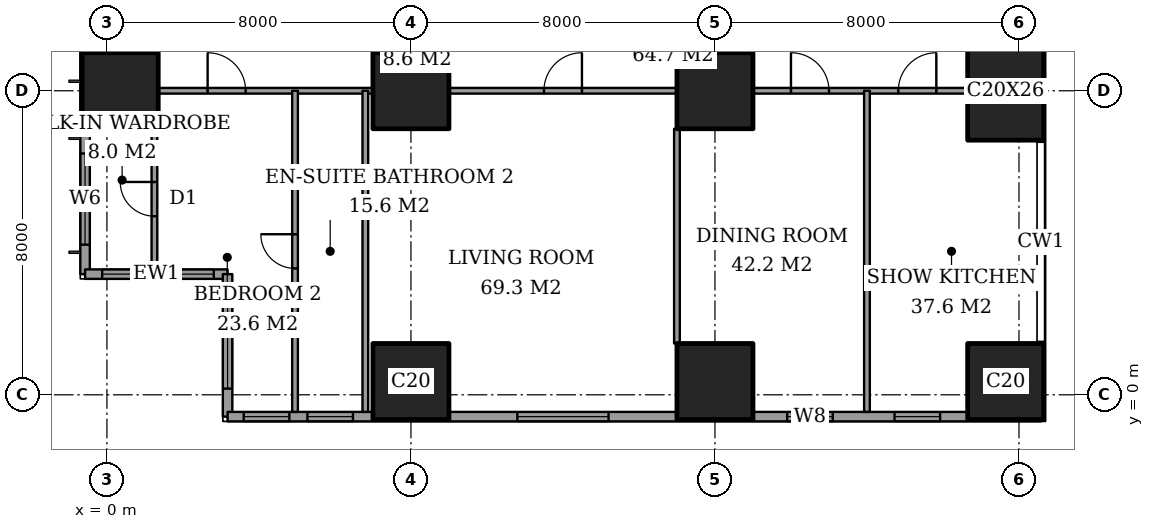
"""IFC4 building model, lengths in metres.
Left out: names, types, materials, properties, quantities, classifications, styles, units other than length and angle.
Written with IfcOpenShell. Run it as: python <this file> out.ifc"""

import sys

from ifc_helpers import new_model, si_unit, direction, frame, frame_2d, origin, origin_2d, place, context, subcontext, project, spatial, rectangle, extrude, element, fill, save


model = new_model("IFC4")
c1 = context("Model", 3, precision=1e-05, world=origin(), true_north=direction((0.0, 1.0)))
c2 = subcontext(c1, "Body", "Model", "MODEL_VIEW")
j1 = project(units=[si_unit("LENGTHUNIT", "METRE"), si_unit("PLANEANGLEUNIT", "RADIAN")], contexts=[c1])
p1 = place(None, origin())
s1 = spatial("IfcSite", under=j1, at=p1, CompositionType="ELEMENT")
p2 = place(p1, origin())
s2 = spatial("IfcBuilding", under=s1, at=p2, CompositionType="ELEMENT")
p3 = place(p2, frame((0.0, 0.0, 80.0)))
s3 = spatial("IfcBuildingStorey", under=s2, at=p3, CompositionType="ELEMENT", Elevation=80.0)
for number, where, z_axis, x_axis in (
    (1, (0.35, 8.0, 0.0), (0.0, 0.0, 1.0), (1.0, 0.0, 0.0)),
    (2, (8.0, 0.35, 0.0), (0.0, 0.0, 1.0), (1.0, 0.0, 0.0)),
    (3, (8.0, 8.0, 0.0), (0.0, 0.0, 1.0), (1.0, 0.0, 0.0)),
    (4, (16.0, 0.35, 0.0), (0.0, 0.0, 1.0), (1.0, 0.0, 0.0)),
    (5, (16.0, 8.0, 0.0), (0.0, 0.0, 1.0), (1.0, 0.0, 0.0)),
    (6, (23.65, 0.35, 0.0), (0.0, 0.0, 1.0), (1.0, 0.0, 0.0)),
):
    element("IfcColumn", number, at=place(p3, frame(where, z_axis=z_axis, x_axis=x_axis)), inside=s3, PredefinedType="COLUMN", context=c2, shape_type="SweptSolid", body=[
        extrude(rectangle(XDim=2.0, YDim=2.0, at=origin_2d()), origin(), (0.0, 0.0, 1.0), 3.6),
    ])
p4 = place(p3, frame((23.65, 8.0, 0.0), z_axis=(0.0, 0.0, 1.0), x_axis=(1.0, 0.0, 0.0)))
e7 = element("IfcColumn", 7, at=p4, inside=s3, PredefinedType="COLUMN", context=c2, shape_type="SweptSolid", body=[
    extrude(rectangle(XDim=2.0, YDim=2.6, at=origin_2d()), origin(), (0.0, 0.0, 1.0), 3.6),
])
p5 = place(p3, frame((-0.575, 44.825, 0.0), z_axis=(0.0, 0.0, 1.0), x_axis=(0.0, -1.0, 0.0)))
e8 = element("IfcWall", 8, at=p5, inside=s3, PredefinedType="SOLIDWALL", context=c2, shape_type="SweptSolid", body=[
    extrude(rectangle(XDim=41.65, YDim=0.25, at=frame_2d((20.825, 0.0))), origin(), (0.0, 0.0, 1.0), 3.6),
])
p6 = place(p5, frame((0.775, 0.0, 0.6)))
e9 = element("IfcOpeningElement", 9, at=p6, cuts=e8, PredefinedType="OPENING", context=c2, shape_type="SweptSolid", body=[
    extrude(rectangle(XDim=2.4, YDim=2.0, at=frame_2d((1.2, 1.0))), frame((0.0, 0.135, 0.0), z_axis=(0.0, -1.0, 0.0), x_axis=(1.0, 0.0, 0.0)), (0.0, 0.0, 1.0), 0.27),
])
p7 = place(p5, frame((6.1, 0.0, 0.6)))
e10 = element("IfcOpeningElement", 10, at=p7, cuts=e8, PredefinedType="OPENING", context=c2, shape_type="SweptSolid", body=[
    extrude(rectangle(XDim=1.2, YDim=2.0, at=frame_2d((0.6, 1.0))), frame((0.0, 0.135, 0.0), z_axis=(0.0, -1.0, 0.0), x_axis=(1.0, 0.0, 0.0)), (0.0, 0.0, 1.0), 0.27),
])
p8 = place(p5, frame((8.425, 0.0, 0.6)))
e11 = element("IfcOpeningElement", 11, at=p8, cuts=e8, PredefinedType="OPENING", context=c2, shape_type="SweptSolid", body=[
    extrude(rectangle(XDim=2.4, YDim=2.0, at=frame_2d((1.2, 1.0))), frame((0.0, 0.135, 0.0), z_axis=(0.0, -1.0, 0.0), x_axis=(1.0, 0.0, 0.0)), (0.0, 0.0, 1.0), 0.27),
])
p9 = place(p5, frame((15.625, 0.0, 0.6)))
e12 = element("IfcOpeningElement", 12, at=p9, cuts=e8, PredefinedType="OPENING", context=c2, shape_type="SweptSolid", body=[
    extrude(rectangle(XDim=2.4, YDim=2.0, at=frame_2d((1.2, 1.0))), frame((0.0, 0.135, 0.0), z_axis=(0.0, -1.0, 0.0), x_axis=(1.0, 0.0, 0.0)), (0.0, 0.0, 1.0), 0.27),
])
p10 = place(p5, frame((23.625, 0.0, 0.6)))
e13 = element("IfcOpeningElement", 13, at=p10, cuts=e8, PredefinedType="OPENING", context=c2, shape_type="SweptSolid", body=[
    extrude(rectangle(XDim=2.4, YDim=2.0, at=frame_2d((1.2, 1.0))), frame((0.0, 0.135, 0.0), z_axis=(0.0, -1.0, 0.0), x_axis=(1.0, 0.0, 0.0)), (0.0, 0.0, 1.0), 0.27),
])
p11 = place(p5, frame((30.825, 0.0, 0.6)))
e14 = element("IfcOpeningElement", 14, at=p11, cuts=e8, PredefinedType="OPENING", context=c2, shape_type="SweptSolid", body=[
    extrude(rectangle(XDim=2.4, YDim=2.0, at=frame_2d((1.2, 1.0))), frame((0.0, 0.135, 0.0), z_axis=(0.0, -1.0, 0.0), x_axis=(1.0, 0.0, 0.0)), (0.0, 0.0, 1.0), 0.27),
])
p12 = place(p5, frame((34.5, 0.0, 0.6)))
e15 = element("IfcOpeningElement", 15, at=p12, cuts=e8, PredefinedType="OPENING", context=c2, shape_type="SweptSolid", body=[
    extrude(rectangle(XDim=1.2, YDim=2.0, at=frame_2d((0.6, 1.0))), frame((0.0, 0.135, 0.0), z_axis=(0.0, -1.0, 0.0), x_axis=(1.0, 0.0, 0.0)), (0.0, 0.0, 1.0), 0.27),
])
p13 = place(p5, frame((38.475, 0.0, 0.6)))
e16 = element("IfcOpeningElement", 16, at=p13, cuts=e8, PredefinedType="OPENING", context=c2, shape_type="SweptSolid", body=[
    extrude(rectangle(XDim=2.4, YDim=2.0, at=frame_2d((1.2, 1.0))), frame((0.0, 0.135, 0.0), z_axis=(0.0, -1.0, 0.0), x_axis=(1.0, 0.0, 0.0)), (0.0, 0.0, 1.0), 0.27),
])
p14 = place(p3, frame((-0.575, 3.175, 0.0), z_axis=(0.0, 0.0, 1.0), x_axis=(1.0, 0.0, 0.0)))
e17 = element("IfcWall", 17, at=p14, inside=s3, PredefinedType="SOLIDWALL", context=c2, shape_type="SweptSolid", body=[
    extrude(rectangle(XDim=3.75, YDim=0.25, at=frame_2d((1.875, 0.0))), origin(), (0.0, 0.0, 1.0), 3.6),
])
p15 = place(p14, frame((0.45, 0.0, 0.6)))
e18 = element("IfcOpeningElement", 18, at=p15, cuts=e17, PredefinedType="OPENING", context=c2, shape_type="SweptSolid", body=[
    extrude(rectangle(XDim=1.2, YDim=2.0, at=frame_2d((0.6, 1.0))), frame((0.0, 0.135, 0.0), z_axis=(0.0, -1.0, 0.0), x_axis=(1.0, 0.0, 0.0)), (0.0, 0.0, 1.0), 0.27),
])
p16 = place(p14, frame((2.188, 0.0, 0.6)))
e19 = element("IfcOpeningElement", 19, at=p16, cuts=e17, PredefinedType="OPENING", context=c2, shape_type="SweptSolid", body=[
    extrude(rectangle(XDim=1.2, YDim=2.0, at=frame_2d((0.6, 1.0))), frame((0.0, 0.135, 0.0), z_axis=(0.0, -1.0, 0.0), x_axis=(1.0, 0.0, 0.0)), (0.0, 0.0, 1.0), 0.27),
])
p17 = place(p3, frame((3.175, 3.175, 0.0), z_axis=(0.0, 0.0, 1.0), x_axis=(0.0, -1.0, 0.0)))
e20 = element("IfcWall", 20, at=p17, inside=s3, PredefinedType="SOLIDWALL", context=c2, shape_type="SweptSolid", body=[
    extrude(rectangle(XDim=3.75, YDim=0.25, at=frame_2d((1.875, 0.0))), origin(), (0.0, 0.0, 1.0), 3.6),
])
p18 = place(p17, frame((0.613, 0.0, 0.6)))
e21 = element("IfcOpeningElement", 21, at=p18, cuts=e20, PredefinedType="OPENING", context=c2, shape_type="SweptSolid", body=[
    extrude(rectangle(XDim=2.4, YDim=2.0, at=frame_2d((1.2, 1.0))), frame((0.0, 0.135, 0.0), z_axis=(0.0, -1.0, 0.0), x_axis=(1.0, 0.0, 0.0)), (0.0, 0.0, 1.0), 0.27),
])
p19 = place(p3, frame((3.175, -0.575, 0.0), z_axis=(0.0, 0.0, 1.0), x_axis=(1.0, 0.0, 0.0)))
e22 = element("IfcWall", 22, at=p19, inside=s3, PredefinedType="SOLIDWALL", context=c2, shape_type="SweptSolid", body=[
    extrude(rectangle(XDim=21.4, YDim=0.25, at=frame_2d((10.7, 0.0))), origin(), (0.0, 0.0, 1.0), 3.6),
])
p20 = place(p19, frame((0.425, 0.0, 0.6)))
e23 = element("IfcOpeningElement", 23, at=p20, cuts=e22, PredefinedType="OPENING", context=c2, shape_type="SweptSolid", body=[
    extrude(rectangle(XDim=1.2, YDim=2.0, at=frame_2d((0.6, 1.0))), frame((0.0, 0.135, 0.0), z_axis=(0.0, -1.0, 0.0), x_axis=(1.0, 0.0, 0.0)), (0.0, 0.0, 1.0), 0.27),
])
p21 = place(p19, frame((2.1, 0.0, 0.6)))
e24 = element("IfcOpeningElement", 24, at=p21, cuts=e22, PredefinedType="OPENING", context=c2, shape_type="SweptSolid", body=[
    extrude(rectangle(XDim=1.2, YDim=2.0, at=frame_2d((0.6, 1.0))), frame((0.0, 0.135, 0.0), z_axis=(0.0, -1.0, 0.0), x_axis=(1.0, 0.0, 0.0)), (0.0, 0.0, 1.0), 0.27),
])
p22 = place(p19, frame((7.625, 0.0, 0.6)))
e25 = element("IfcOpeningElement", 25, at=p22, cuts=e22, PredefinedType="OPENING", context=c2, shape_type="SweptSolid", body=[
    extrude(rectangle(XDim=2.4, YDim=2.0, at=frame_2d((1.2, 1.0))), frame((0.0, 0.135, 0.0), z_axis=(0.0, -1.0, 0.0), x_axis=(1.0, 0.0, 0.0)), (0.0, 0.0, 1.0), 0.27),
])
p23 = place(p19, frame((14.725, 0.0, 0.6)))
e26 = element("IfcOpeningElement", 26, at=p23, cuts=e22, PredefinedType="OPENING", context=c2, shape_type="SweptSolid", body=[
    extrude(rectangle(XDim=1.2, YDim=2.0, at=frame_2d((0.6, 1.0))), frame((0.0, 0.135, 0.0), z_axis=(0.0, -1.0, 0.0), x_axis=(1.0, 0.0, 0.0)), (0.0, 0.0, 1.0), 0.27),
])
p24 = place(p19, frame((17.55, 0.0, 0.6)))
e27 = element("IfcOpeningElement", 27, at=p24, cuts=e22, PredefinedType="OPENING", context=c2, shape_type="SweptSolid", body=[
    extrude(rectangle(XDim=1.2, YDim=2.0, at=frame_2d((0.6, 1.0))), frame((0.0, 0.135, 0.0), z_axis=(0.0, -1.0, 0.0), x_axis=(1.0, 0.0, 0.0)), (0.0, 0.0, 1.0), 0.27),
])
p25 = place(p3, frame((1.35, 8.0, 0.0), z_axis=(0.0, 0.0, 1.0), x_axis=(1.0, 0.0, 0.0)))
e28 = element("IfcWall", 28, at=p25, inside=s3, PredefinedType="PARTITIONING", context=c2, shape_type="SweptSolid", body=[
    extrude(rectangle(XDim=5.65, YDim=0.15, at=frame_2d((2.825, 0.0))), origin(), (0.0, 0.0, 1.0), 3.35),
])
p26 = place(p25, frame((1.3, 0.0, 0.0)))
e29 = element("IfcOpeningElement", 29, at=p26, cuts=e28, PredefinedType="OPENING", context=c2, shape_type="SweptSolid", body=[
    extrude(rectangle(XDim=1.0, YDim=2.1, at=frame_2d((0.5, 1.05))), frame((0.0, 0.085, 0.0), z_axis=(0.0, -1.0, 0.0), x_axis=(1.0, 0.0, 0.0)), (0.0, 0.0, 1.0), 0.17),
])
p27 = place(p3, frame((9.0, 8.0, 0.0), z_axis=(0.0, 0.0, 1.0), x_axis=(1.0, 0.0, 0.0)))
e30 = element("IfcWall", 30, at=p27, inside=s3, PredefinedType="PARTITIONING", context=c2, shape_type="SweptSolid", body=[
    extrude(rectangle(XDim=6.0, YDim=0.15, at=frame_2d((3.0, 0.0))), origin(), (0.0, 0.0, 1.0), 3.35),
])
p28 = place(p27, frame((2.5, 0.0, 0.0)))
e31 = element("IfcOpeningElement", 31, at=p28, cuts=e30, PredefinedType="OPENING", context=c2, shape_type="SweptSolid", body=[
    extrude(rectangle(XDim=1.0, YDim=2.1, at=frame_2d((0.5, 1.05))), frame((0.0, 0.085, 0.0), z_axis=(0.0, -1.0, 0.0), x_axis=(1.0, 0.0, 0.0)), (0.0, 0.0, 1.0), 0.17),
])
p29 = place(p3, frame((17.0, 8.0, 0.0), z_axis=(0.0, 0.0, 1.0), x_axis=(1.0, 0.0, 0.0)))
e32 = element("IfcWall", 32, at=p29, inside=s3, PredefinedType="PARTITIONING", context=c2, shape_type="SweptSolid", body=[
    extrude(rectangle(XDim=5.65, YDim=0.15, at=frame_2d((2.825, 0.0))), origin(), (0.0, 0.0, 1.0), 3.35),
])
p30 = place(p29, frame((1.0, 0.0, 0.0)))
e33 = element("IfcOpeningElement", 33, at=p30, cuts=e32, PredefinedType="OPENING", context=c2, shape_type="SweptSolid", body=[
    extrude(rectangle(XDim=1.0, YDim=2.1, at=frame_2d((0.5, 1.05))), frame((0.0, 0.085, 0.0), z_axis=(0.0, -1.0, 0.0), x_axis=(1.0, 0.0, 0.0)), (0.0, 0.0, 1.0), 0.17),
])
p31 = place(p29, frame((3.825, 0.0, 0.0)))
e34 = element("IfcOpeningElement", 34, at=p31, cuts=e32, PredefinedType="OPENING", context=c2, shape_type="SweptSolid", body=[
    extrude(rectangle(XDim=1.0, YDim=2.1, at=frame_2d((0.5, 1.05))), frame((0.0, 0.085, 0.0), z_axis=(0.0, -1.0, 0.0), x_axis=(1.0, 0.0, 0.0)), (0.0, 0.0, 1.0), 0.17),
])
p32 = place(p3, frame((1.25, 3.3, 0.0), z_axis=(0.0, 0.0, 1.0), x_axis=(0.0, 1.0, 0.0)))
e35 = element("IfcWall", 35, at=p32, inside=s3, PredefinedType="PARTITIONING", context=c2, shape_type="SweptSolid", body=[
    extrude(rectangle(XDim=3.7, YDim=0.15, at=frame_2d((1.85, 0.0))), origin(), (0.0, 0.0, 1.0), 3.35),
])
p33 = place(p32, frame((1.4, 0.0, 0.0)))
e36 = element("IfcOpeningElement", 36, at=p33, cuts=e35, PredefinedType="OPENING", context=c2, shape_type="SweptSolid", body=[
    extrude(rectangle(XDim=0.9, YDim=2.1, at=frame_2d((0.45, 1.05))), frame((0.0, 0.085, 0.0), z_axis=(0.0, -1.0, 0.0), x_axis=(1.0, 0.0, 0.0)), (0.0, 0.0, 1.0), 0.17),
])
p34 = place(p3, frame((4.95, -0.45, 0.0), z_axis=(0.0, 0.0, 1.0), x_axis=(0.0, 1.0, 0.0)))
e37 = element("IfcWall", 37, at=p34, inside=s3, PredefinedType="PARTITIONING", context=c2, shape_type="SweptSolid", body=[
    extrude(rectangle(XDim=8.45, YDim=0.15, at=frame_2d((4.225, 0.0))), origin(), (0.0, 0.0, 1.0), 3.35),
])
p35 = place(p34, frame((3.775, 0.0, 0.0)))
e38 = element("IfcOpeningElement", 38, at=p35, cuts=e37, PredefinedType="OPENING", context=c2, shape_type="SweptSolid", body=[
    extrude(rectangle(XDim=0.9, YDim=2.1, at=frame_2d((0.45, 1.05))), frame((0.0, 0.085, 0.0), z_axis=(0.0, -1.0, 0.0), x_axis=(1.0, 0.0, 0.0)), (0.0, 0.0, 1.0), 0.17),
])
p36 = place(p3, frame((6.8, -0.45, 0.0), z_axis=(0.0, 0.0, 1.0), x_axis=(0.0, 1.0, 0.0)))
e39 = element("IfcWall", 39, at=p36, inside=s3, PredefinedType="PARTITIONING", context=c2, shape_type="SweptSolid", body=[
    extrude(rectangle(XDim=8.45, YDim=0.15, at=frame_2d((4.225, 0.0))), origin(), (0.0, 0.0, 1.0), 3.35),
])
p37 = place(p3, frame((15.0, 1.35, 0.0), z_axis=(0.0, 0.0, 1.0), x_axis=(0.0, 1.0, 0.0)))
e40 = element("IfcWall", 40, at=p37, inside=s3, PredefinedType="PARTITIONING", context=c2, shape_type="SweptSolid", body=[
    extrude(rectangle(XDim=5.65, YDim=0.15, at=frame_2d((2.825, 0.0))), origin(), (0.0, 0.0, 1.0), 3.35),
])
p38 = place(p3, frame((20.0, -0.45, 0.0), z_axis=(0.0, 0.0, 1.0), x_axis=(0.0, 1.0, 0.0)))
e41 = element("IfcWall", 41, at=p38, inside=s3, PredefinedType="PARTITIONING", context=c2, shape_type="SweptSolid", body=[
    extrude(rectangle(XDim=8.45, YDim=0.15, at=frame_2d((4.225, 0.0))), origin(), (0.0, 0.0, 1.0), 3.35),
])
p39 = place(p13, origin())
e42 = element("IfcWindow", 42, at=p39, inside=s3, PartitioningType="SINGLE_PANEL", PredefinedType="WINDOW", context=c2, shape_type="SweptSolid", body=[
    extrude(rectangle(XDim=2.4, YDim=2.0, at=frame_2d((1.2, 1.0))), frame((0.0, 0.03, 0.0), z_axis=(0.0, -1.0, 0.0), x_axis=(1.0, 0.0, 0.0)), (0.0, 0.0, 1.0), 0.06),
])
fill(e16, e42)
p40 = place(p15, origin())
e43 = element("IfcWindow", 43, at=p40, inside=s3, PartitioningType="SINGLE_PANEL", PredefinedType="WINDOW", context=c2, shape_type="SweptSolid", body=[
    extrude(rectangle(XDim=1.2, YDim=2.0, at=frame_2d((0.6, 1.0))), frame((0.0, 0.03, 0.0), z_axis=(0.0, -1.0, 0.0), x_axis=(1.0, 0.0, 0.0)), (0.0, 0.0, 1.0), 0.06),
])
fill(e18, e43)
p41 = place(p16, origin())
e44 = element("IfcWindow", 44, at=p41, inside=s3, PartitioningType="SINGLE_PANEL", PredefinedType="WINDOW", context=c2, shape_type="SweptSolid", body=[
    extrude(rectangle(XDim=1.2, YDim=2.0, at=frame_2d((0.6, 1.0))), frame((0.0, 0.03, 0.0), z_axis=(0.0, -1.0, 0.0), x_axis=(1.0, 0.0, 0.0)), (0.0, 0.0, 1.0), 0.06),
])
fill(e19, e44)
p42 = place(p18, origin())
e45 = element("IfcWindow", 45, at=p42, inside=s3, PartitioningType="SINGLE_PANEL", PredefinedType="WINDOW", context=c2, shape_type="SweptSolid", body=[
    extrude(rectangle(XDim=2.4, YDim=2.0, at=frame_2d((1.2, 1.0))), frame((0.0, 0.03, 0.0), z_axis=(0.0, -1.0, 0.0), x_axis=(1.0, 0.0, 0.0)), (0.0, 0.0, 1.0), 0.06),
])
fill(e21, e45)
p43 = place(p20, origin())
e46 = element("IfcWindow", 46, at=p43, inside=s3, PartitioningType="SINGLE_PANEL", PredefinedType="WINDOW", context=c2, shape_type="SweptSolid", body=[
    extrude(rectangle(XDim=1.2, YDim=2.0, at=frame_2d((0.6, 1.0))), frame((0.0, 0.03, 0.0), z_axis=(0.0, -1.0, 0.0), x_axis=(1.0, 0.0, 0.0)), (0.0, 0.0, 1.0), 0.06),
])
fill(e23, e46)
p44 = place(p21, origin())
e47 = element("IfcWindow", 47, at=p44, inside=s3, PartitioningType="SINGLE_PANEL", PredefinedType="WINDOW", context=c2, shape_type="SweptSolid", body=[
    extrude(rectangle(XDim=1.2, YDim=2.0, at=frame_2d((0.6, 1.0))), frame((0.0, 0.03, 0.0), z_axis=(0.0, -1.0, 0.0), x_axis=(1.0, 0.0, 0.0)), (0.0, 0.0, 1.0), 0.06),
])
fill(e24, e47)
p45 = place(p22, origin())
e48 = element("IfcWindow", 48, at=p45, inside=s3, PartitioningType="SINGLE_PANEL", PredefinedType="WINDOW", context=c2, shape_type="SweptSolid", body=[
    extrude(rectangle(XDim=2.4, YDim=2.0, at=frame_2d((1.2, 1.0))), frame((0.0, 0.03, 0.0), z_axis=(0.0, -1.0, 0.0), x_axis=(1.0, 0.0, 0.0)), (0.0, 0.0, 1.0), 0.06),
])
fill(e25, e48)
p46 = place(p23, origin())
e49 = element("IfcWindow", 49, at=p46, inside=s3, PartitioningType="SINGLE_PANEL", PredefinedType="WINDOW", context=c2, shape_type="SweptSolid", body=[
    extrude(rectangle(XDim=1.2, YDim=2.0, at=frame_2d((0.6, 1.0))), frame((0.0, 0.03, 0.0), z_axis=(0.0, -1.0, 0.0), x_axis=(1.0, 0.0, 0.0)), (0.0, 0.0, 1.0), 0.06),
])
fill(e26, e49)
p47 = place(p24, origin())
e50 = element("IfcWindow", 50, at=p47, inside=s3, PartitioningType="SINGLE_PANEL", PredefinedType="WINDOW", context=c2, shape_type="SweptSolid", body=[
    extrude(rectangle(XDim=1.2, YDim=2.0, at=frame_2d((0.6, 1.0))), frame((0.0, 0.03, 0.0), z_axis=(0.0, -1.0, 0.0), x_axis=(1.0, 0.0, 0.0)), (0.0, 0.0, 1.0), 0.06),
])
fill(e27, e50)
p48 = place(p33, origin())
e51 = element("IfcDoor", 51, at=p48, inside=s3, OperationType="SINGLE_SWING_LEFT", PredefinedType="DOOR", context=c2, shape_type="SweptSolid", body=[
    extrude(rectangle(XDim=0.9, YDim=2.1, at=frame_2d((0.45, 1.05))), frame((0.0, 0.025, 0.0), z_axis=(0.0, -1.0, 0.0), x_axis=(1.0, 0.0, 0.0)), (0.0, 0.0, 1.0), 0.05),
])
fill(e36, e51)
p49 = place(p26, origin())
e52 = element("IfcDoor", 52, at=p49, inside=s3, OperationType="SINGLE_SWING_RIGHT", PredefinedType="DOOR", context=c2, shape_type="SweptSolid", body=[
    extrude(rectangle(XDim=1.0, YDim=2.1, at=frame_2d((0.5, 1.05))), frame((0.0, 0.025, 0.0), z_axis=(0.0, -1.0, 0.0), x_axis=(1.0, 0.0, 0.0)), (0.0, 0.0, 1.0), 0.05),
])
fill(e29, e52)
p50 = place(p35, origin())
e53 = element("IfcDoor", 53, at=p50, inside=s3, OperationType="SINGLE_SWING_LEFT", PredefinedType="DOOR", context=c2, shape_type="SweptSolid", body=[
    extrude(rectangle(XDim=0.9, YDim=2.1, at=frame_2d((0.45, 1.05))), frame((0.0, 0.025, 0.0), z_axis=(0.0, -1.0, 0.0), x_axis=(1.0, 0.0, 0.0)), (0.0, 0.0, 1.0), 0.05),
])
fill(e38, e53)
p51 = place(p28, origin())
e54 = element("IfcDoor", 54, at=p51, inside=s3, OperationType="SINGLE_SWING_LEFT", PredefinedType="DOOR", context=c2, shape_type="SweptSolid", body=[
    extrude(rectangle(XDim=1.0, YDim=2.1, at=frame_2d((0.5, 1.05))), frame((0.0, 0.025, 0.0), z_axis=(0.0, -1.0, 0.0), x_axis=(1.0, 0.0, 0.0)), (0.0, 0.0, 1.0), 0.05),
])
fill(e31, e54)
p52 = place(p30, origin())
e55 = element("IfcDoor", 55, at=p52, inside=s3, OperationType="SINGLE_SWING_RIGHT", PredefinedType="DOOR", context=c2, shape_type="SweptSolid", body=[
    extrude(rectangle(XDim=1.0, YDim=2.1, at=frame_2d((0.5, 1.05))), frame((0.0, 0.025, 0.0), z_axis=(0.0, -1.0, 0.0), x_axis=(1.0, 0.0, 0.0)), (0.0, 0.0, 1.0), 0.05),
])
fill(e33, e55)
p53 = place(p31, origin())
e56 = element("IfcDoor", 56, at=p53, inside=s3, OperationType="SINGLE_SWING_LEFT", PredefinedType="DOOR", context=c2, shape_type="SweptSolid", body=[
    extrude(rectangle(XDim=1.0, YDim=2.1, at=frame_2d((0.5, 1.05))), frame((0.0, 0.025, 0.0), z_axis=(0.0, -1.0, 0.0), x_axis=(1.0, 0.0, 0.0)), (0.0, 0.0, 1.0), 0.05),
])
fill(e34, e56)
save(model, sys.argv[1])
